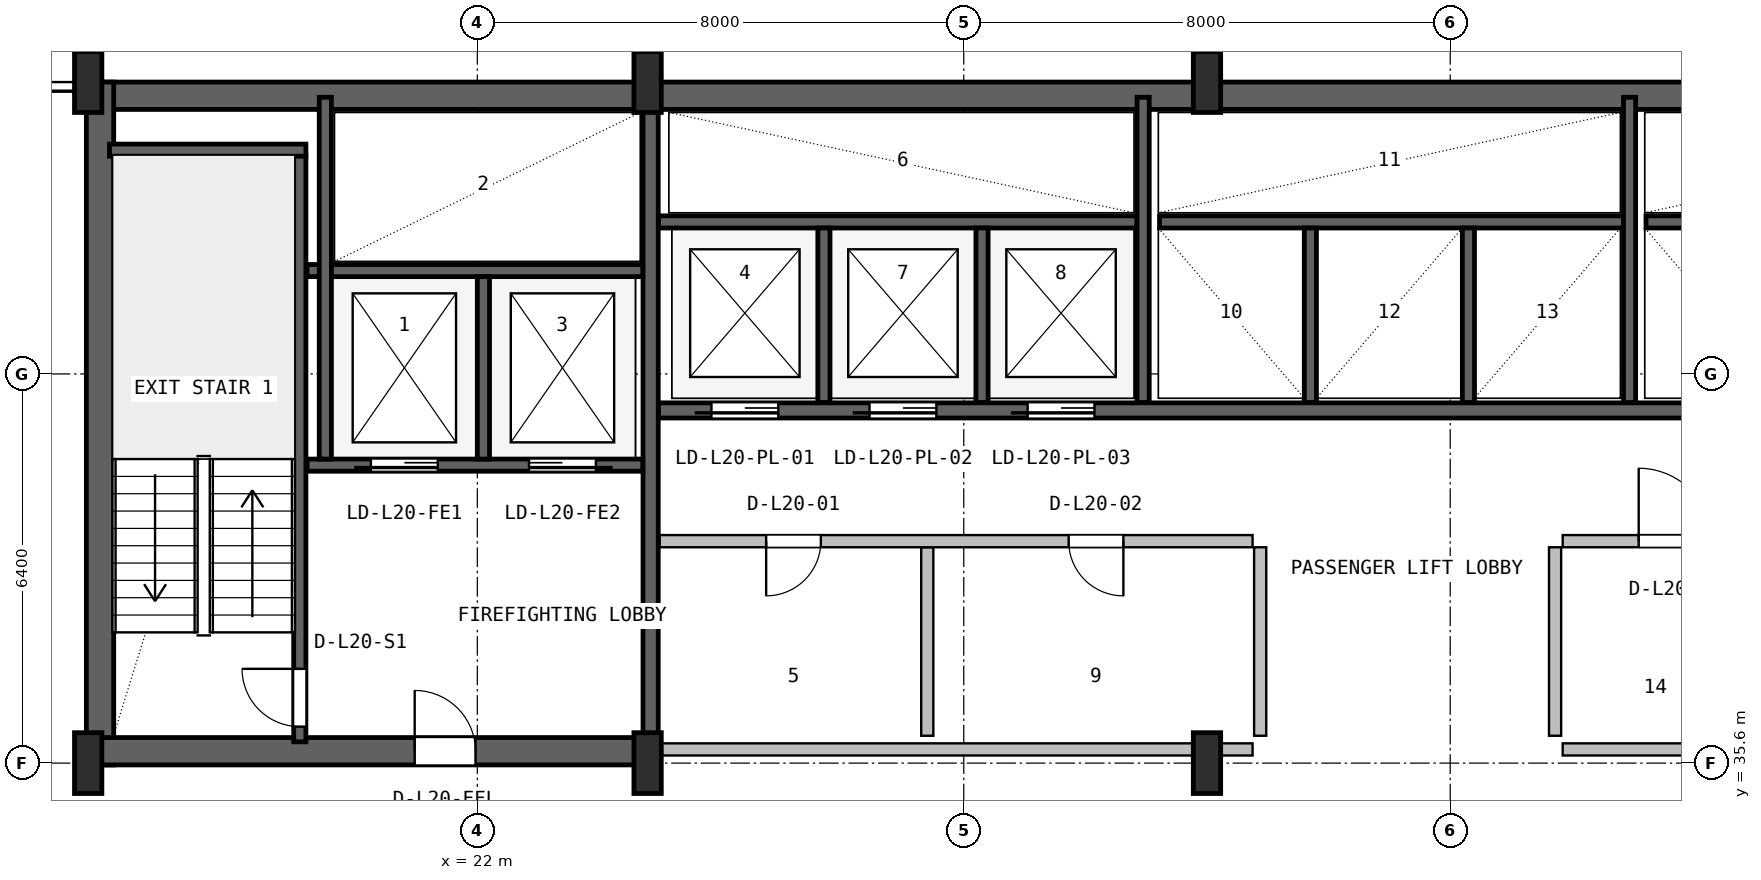
"""IFC4 building model, lengths in metres.
Left out: names, types, materials, properties, quantities, classifications, styles, units other than length and angle.
Written with IfcOpenShell. Run it as: python <this file> out.ifc"""

import sys

from ifc_helpers import new_model, si_unit, direction, frame, frame_2d, origin, origin_2d, place, context, subcontext, project, spatial, rectangle, i_section, extrude, source, transform, mapped, element, fill, save


model = new_model("IFC4")
c1 = context("Model", 3, precision=1e-05, world=origin(), true_north=direction((0.0, 1.0)))
c2 = subcontext(c1, "Body", "Model", "MODEL_VIEW")
j1 = project(units=[si_unit("LENGTHUNIT", "METRE"), si_unit("PLANEANGLEUNIT", "RADIAN")], contexts=[c1])
p1 = place(None, origin())
s1 = spatial("IfcSite", under=j1, at=p1, CompositionType="ELEMENT")
p2 = place(p1, origin())
s2 = spatial("IfcBuilding", under=s1, at=p2, CompositionType="ELEMENT")
p3 = place(p2, frame((0.0, 0.0, 87.0)))
s3 = spatial("IfcBuildingStorey", under=s2, at=p3, CompositionType="ELEMENT", Elevation=87.0)
p4 = place(p3, frame((15.6, 46.575, 0.0), z_axis=(0.0, 0.0, 1.0), x_axis=(1.0, 0.0, 0.0)))
e1 = element("IfcWall", 1, at=p4, inside=s3, PredefinedType="SHEAR", context=c2, shape_type="SweptSolid", body=[
    extrude(rectangle(XDim=36.8, YDim=0.45, at=frame_2d((18.4, 0.0))), origin(), (0.0, 0.0, 1.0), 3.55),
])
p5 = place(p3, frame((15.795, 35.57, 0.0), z_axis=(0.0, 0.0, 1.0), x_axis=(0.0, 1.0, 0.0)))
e2 = element("IfcWall", 2, at=p5, inside=s3, PredefinedType="SHEAR", context=c2, shape_type="SweptSolid", body=[
    extrude(rectangle(XDim=11.23, YDim=0.45, at=frame_2d((5.615, 0.0))), origin(), (0.0, 0.0, 1.0), 3.55),
])
p6 = place(p3, frame((15.57, 35.795, 0.0), z_axis=(0.0, 0.0, 1.0), x_axis=(1.0, 0.0, 0.0)))
e3 = element("IfcWall", 3, at=p6, inside=s3, PredefinedType="SHEAR", context=c2, shape_type="SweptSolid", body=[
    extrude(rectangle(XDim=9.23, YDim=0.45, at=frame_2d((4.615, 0.0))), origin(), (0.0, 0.0, 1.0), 3.55),
])
p7 = place(p6, frame((5.4, 0.0, 0.0)))
e4 = element("IfcOpeningElement", 4, at=p7, cuts=e3, PredefinedType="OPENING", context=c2, shape_type="SweptSolid", body=[
    extrude(rectangle(XDim=1.0, YDim=2.1, at=frame_2d((0.5, 1.05))), frame((0.0, 0.235, 0.0), z_axis=(0.0, -1.0, 0.0), x_axis=(1.0, 0.0, 0.0)), (0.0, 0.0, 1.0), 0.47),
])
m1 = source(origin(), c2, "Body", "SweptSolid", [
    extrude(i_section(OverallWidth=0.45, OverallDepth=1.0, WebThickness=0.016, FlangeThickness=0.03, FilletRadius=0.016, at=origin_2d()), origin(), (0.0, 0.0, 1.0), 3.8),
])
for number, where, z_axis, x_axis in (
    (5, (15.6, 35.6, 0.0), (0.0, 0.0, 1.0), (1.0, 0.0, 0.0)),
    (6, (15.6, 46.8, 0.0), (0.0, 0.0, 1.0), (1.0, 0.0, 0.0)),
    (7, (24.8, 35.6, 0.0), (0.0, 0.0, 1.0), (1.0, 0.0, 0.0)),
    (8, (24.8, 46.8, 0.0), (0.0, 0.0, 1.0), (1.0, 0.0, 0.0)),
    (9, (34.0, 35.6, 0.0), (0.0, 0.0, 1.0), (1.0, 0.0, 0.0)),
    (10, (34.0, 46.8, 0.0), (0.0, 0.0, 1.0), (1.0, 0.0, 0.0)),
):
    element("IfcColumn", number, at=place(p3, frame(where, z_axis=z_axis, x_axis=x_axis)), inside=s3, PredefinedType="COLUMN", context=c2, shape_type="MappedRepresentation", body=[
        mapped(m1, transform((0.0, 0.0, 0.0), x_axis=(1.0, 0.0, 0.0), y_axis=(0.0, 1.0, 0.0), z_axis=(0.0, 0.0, 1.0), scale=1.0)),
    ])
p8 = place(p3, frame((19.08, 35.95, 0.0), z_axis=(0.0, 0.0, 1.0), x_axis=(0.0, 1.0, 0.0)))
e11 = element("IfcWall", 11, at=p8, inside=s3, PredefinedType="SHEAR", context=c2, shape_type="SweptSolid", body=[
    extrude(rectangle(XDim=9.65, YDim=0.2, at=frame_2d((4.825, 0.0))), origin(), (0.0, 0.0, 1.0), 3.55),
])
p9 = place(p8, frame((0.25, 0.0, 0.0)))
e12 = element("IfcOpeningElement", 12, at=p9, cuts=e11, PredefinedType="OPENING", context=c2, shape_type="SweptSolid", body=[
    extrude(rectangle(XDim=0.95, YDim=2.1, at=frame_2d((0.475, 1.05))), frame((0.0, 0.11, 0.0), z_axis=(0.0, -1.0, 0.0), x_axis=(1.0, 0.0, 0.0)), (0.0, 0.0, 1.0), 0.22),
])
p10 = place(p3, frame((15.95, 45.68, 0.0), z_axis=(0.0, 0.0, 1.0), x_axis=(1.0, 0.0, 0.0)))
e13 = element("IfcWall", 13, at=p10, inside=s3, PredefinedType="SHEAR", context=c2, shape_type="SweptSolid", body=[
    extrude(rectangle(XDim=3.23, YDim=0.2, at=frame_2d((1.615, 0.0))), origin(), (0.0, 0.0, 1.0), 3.55),
])
p11 = place(p3, frame((24.85, 36.05, 0.0), z_axis=(0.0, 0.0, 1.0), x_axis=(0.0, 1.0, 0.0)))
e14 = element("IfcWall", 14, at=p11, inside=s3, PredefinedType="SHEAR", context=c2, shape_type="SweptSolid", body=[
    extrude(rectangle(XDim=10.45, YDim=0.25, at=frame_2d((5.225, 0.0))), origin(), (0.0, 0.0, 1.0), 3.55),
])
p12 = place(p3, frame((19.2, 40.5, 0.0), z_axis=(0.0, 0.0, 1.0), x_axis=(1.0, 0.0, 0.0)))
e15 = element("IfcWall", 15, at=p12, inside=s3, PredefinedType="SHEAR", context=c2, shape_type="SweptSolid", body=[
    extrude(rectangle(XDim=5.52, YDim=0.2, at=frame_2d((2.76, 0.0))), origin(), (0.0, 0.0, 1.0), 3.55),
])
p13 = place(p12, frame((1.05, 0.0, 0.0)))
e16 = element("IfcOpeningElement", 16, at=p13, cuts=e15, PredefinedType="OPENING", context=c2, shape_type="SweptSolid", body=[
    extrude(rectangle(XDim=1.1, YDim=2.18, at=frame_2d((0.55, 1.09))), frame((0.0, 0.11, 0.0), z_axis=(0.0, -1.0, 0.0), x_axis=(1.0, 0.0, 0.0)), (0.0, 0.0, 1.0), 0.22),
])
p14 = place(p12, frame((3.65, 0.0, 0.0)))
e17 = element("IfcOpeningElement", 17, at=p14, cuts=e15, PredefinedType="OPENING", context=c2, shape_type="SweptSolid", body=[
    extrude(rectangle(XDim=1.1, YDim=2.18, at=frame_2d((0.55, 1.09))), frame((0.0, 0.11, 0.0), z_axis=(0.0, -1.0, 0.0), x_axis=(1.0, 0.0, 0.0)), (0.0, 0.0, 1.0), 0.22),
])
p15 = place(p3, frame((19.2, 43.7, 0.0), z_axis=(0.0, 0.0, 1.0), x_axis=(1.0, 0.0, 0.0)))
e18 = element("IfcWall", 18, at=p15, inside=s3, PredefinedType="SHEAR", context=c2, shape_type="SweptSolid", body=[
    extrude(rectangle(XDim=5.52, YDim=0.2, at=frame_2d((2.76, 0.0))), origin(), (0.0, 0.0, 1.0), 3.55),
])
p16 = place(p3, frame((22.1, 40.6, 0.0), z_axis=(0.0, 0.0, 1.0), x_axis=(0.0, 1.0, 0.0)))
e19 = element("IfcWall", 19, at=p16, inside=s3, PredefinedType="SHEAR", context=c2, shape_type="SweptSolid", body=[
    extrude(rectangle(XDim=3.0, YDim=0.2, at=frame_2d((1.5, 0.0))), origin(), (0.0, 0.0, 1.0), 3.55),
])
p17 = place(p3, frame((19.5, 40.6, 0.0), z_axis=(0.0, 0.0, 1.0), x_axis=(0.0, 1.0, 0.0)))
e20 = element("IfcWall", 20, at=p17, inside=s3, PredefinedType="SHEAR", context=c2, shape_type="SweptSolid", body=[
    extrude(rectangle(XDim=5.95, YDim=0.2, at=frame_2d((2.975, 0.0))), origin(), (0.0, 0.0, 1.0), 3.55),
])
p18 = place(p3, frame((24.98, 41.4, 0.0), z_axis=(0.0, 0.0, 1.0), x_axis=(1.0, 0.0, 0.0)))
e21 = element("IfcWall", 21, at=p18, inside=s3, PredefinedType="SHEAR", context=c2, shape_type="SweptSolid", body=[
    extrude(rectangle(XDim=23.82, YDim=0.25, at=frame_2d((11.91, 0.0))), origin(), (0.0, 0.0, 1.0), 3.55),
])
p19 = place(p18, frame((0.87, 0.0, 0.0)))
e22 = element("IfcOpeningElement", 22, at=p19, cuts=e21, PredefinedType="OPENING", context=c2, shape_type="SweptSolid", body=[
    extrude(rectangle(XDim=1.1, YDim=2.18, at=frame_2d((0.55, 1.09))), frame((0.0, 0.135, 0.0), z_axis=(0.0, -1.0, 0.0), x_axis=(1.0, 0.0, 0.0)), (0.0, 0.0, 1.0), 0.27),
])
p20 = place(p18, frame((3.47, 0.0, 0.0)))
e23 = element("IfcOpeningElement", 23, at=p20, cuts=e21, PredefinedType="OPENING", context=c2, shape_type="SweptSolid", body=[
    extrude(rectangle(XDim=1.1, YDim=2.18, at=frame_2d((0.55, 1.09))), frame((0.0, 0.135, 0.0), z_axis=(0.0, -1.0, 0.0), x_axis=(1.0, 0.0, 0.0)), (0.0, 0.0, 1.0), 0.27),
])
p21 = place(p18, frame((6.07, 0.0, 0.0)))
e24 = element("IfcOpeningElement", 24, at=p21, cuts=e21, PredefinedType="OPENING", context=c2, shape_type="SweptSolid", body=[
    extrude(rectangle(XDim=1.1, YDim=2.18, at=frame_2d((0.55, 1.09))), frame((0.0, 0.135, 0.0), z_axis=(0.0, -1.0, 0.0), x_axis=(1.0, 0.0, 0.0)), (0.0, 0.0, 1.0), 0.27),
])
p22 = place(p3, frame((24.98, 44.5, 0.0), z_axis=(0.0, 0.0, 1.0), x_axis=(1.0, 0.0, 0.0)))
e25 = element("IfcWall", 25, at=p22, inside=s3, PredefinedType="SHEAR", context=c2, shape_type="SweptSolid", body=[
    extrude(rectangle(XDim=7.87, YDim=0.2, at=frame_2d((3.935, 0.0))), origin(), (0.0, 0.0, 1.0), 3.55),
])
for number, where, z_axis, x_axis in (
    (26, (27.7, 41.53, 0.0), (0.0, 0.0, 1.0), (0.0, 1.0, 0.0)),
    (27, (30.3, 41.53, 0.0), (0.0, 0.0, 1.0), (0.0, 1.0, 0.0)),
):
    element("IfcWall", number, at=place(p3, frame(where, z_axis=z_axis, x_axis=x_axis)), inside=s3, PredefinedType="SHEAR", context=c2, shape_type="SweptSolid", body=[
        extrude(rectangle(XDim=2.87, YDim=0.2, at=frame_2d((1.435, 0.0))), origin(), (0.0, 0.0, 1.0), 3.55),
    ])
p23 = place(p3, frame((32.95, 41.53, 0.0), z_axis=(0.0, 0.0, 1.0), x_axis=(0.0, 1.0, 0.0)))
e28 = element("IfcWall", 28, at=p23, inside=s3, PredefinedType="SHEAR", context=c2, shape_type="SweptSolid", body=[
    extrude(rectangle(XDim=5.02, YDim=0.2, at=frame_2d((2.51, 0.0))), origin(), (0.0, 0.0, 1.0), 3.55),
])
p24 = place(p3, frame((33.22, 44.5, 0.0), z_axis=(0.0, 0.0, 1.0), x_axis=(1.0, 0.0, 0.0)))
e29 = element("IfcWall", 29, at=p24, inside=s3, PredefinedType="SHEAR", context=c2, shape_type="SweptSolid", body=[
    extrude(rectangle(XDim=7.63, YDim=0.2, at=frame_2d((3.815, 0.0))), origin(), (0.0, 0.0, 1.0), 3.55),
])
for number, where, z_axis, x_axis in (
    (30, (35.7, 41.53, 0.0), (0.0, 0.0, 1.0), (0.0, 1.0, 0.0)),
    (31, (38.3, 41.53, 0.0), (0.0, 0.0, 1.0), (0.0, 1.0, 0.0)),
):
    element("IfcWall", number, at=place(p3, frame(where, z_axis=z_axis, x_axis=x_axis)), inside=s3, PredefinedType="SHEAR", context=c2, shape_type="SweptSolid", body=[
        extrude(rectangle(XDim=2.87, YDim=0.2, at=frame_2d((1.435, 0.0))), origin(), (0.0, 0.0, 1.0), 3.55),
    ])
p25 = place(p3, frame((40.95, 41.53, 0.0), z_axis=(0.0, 0.0, 1.0), x_axis=(0.0, 1.0, 0.0)))
e32 = element("IfcWall", 32, at=p25, inside=s3, PredefinedType="SHEAR", context=c2, shape_type="SweptSolid", body=[
    extrude(rectangle(XDim=5.02, YDim=0.2, at=frame_2d((2.51, 0.0))), origin(), (0.0, 0.0, 1.0), 3.55),
])
p26 = place(p3, frame((41.22, 44.5, 0.0), z_axis=(0.0, 0.0, 1.0), x_axis=(1.0, 0.0, 0.0)))
e33 = element("IfcWall", 33, at=p26, inside=s3, PredefinedType="SHEAR", context=c2, shape_type="SweptSolid", body=[
    extrude(rectangle(XDim=7.58, YDim=0.2, at=frame_2d((3.79, 0.0))), origin(), (0.0, 0.0, 1.0), 3.55),
])
p27 = place(p3, frame((25.0, 35.825, 0.0), z_axis=(0.0, 0.0, 1.0), x_axis=(1.0, 0.0, 0.0)))
e34 = element("IfcWall", 34, at=p27, inside=s3, PredefinedType="PLUMBINGWALL", context=c2, shape_type="SweptSolid", body=[
    extrude(rectangle(XDim=9.75, YDim=0.2, at=frame_2d((4.875, 0.0))), origin(), (0.0, 0.0, 1.0), 2.325),
])
p28 = place(p3, frame((29.4, 36.05, 0.0), z_axis=(0.0, 0.0, 1.0), x_axis=(0.0, 1.0, 0.0)))
e35 = element("IfcWall", 35, at=p28, inside=s3, PredefinedType="PLUMBINGWALL", context=c2, shape_type="SweptSolid", body=[
    extrude(rectangle(XDim=3.1, YDim=0.2, at=frame_2d((1.55, 0.0))), origin(), (0.0, 0.0, 1.0), 3.53),
])
p29 = place(p3, frame((25.0, 39.25, 0.0), z_axis=(0.0, 0.0, 1.0), x_axis=(1.0, 0.0, 0.0)))
e36 = element("IfcWall", 36, at=p29, inside=s3, PredefinedType="PLUMBINGWALL", context=c2, shape_type="SweptSolid", body=[
    extrude(rectangle(XDim=9.75, YDim=0.2, at=frame_2d((4.875, 0.0))), origin(), (0.0, 0.0, 1.0), 3.53),
])
p30 = place(p29, frame((1.75, 0.0, 0.0)))
e37 = element("IfcOpeningElement", 37, at=p30, cuts=e36, PredefinedType="OPENING", context=c2, shape_type="SweptSolid", body=[
    extrude(rectangle(XDim=0.9, YDim=2.06, at=frame_2d((0.45, 1.03))), frame((0.0, 0.11, 0.0), z_axis=(0.0, -1.0, 0.0), x_axis=(1.0, 0.0, 0.0)), (0.0, 0.0, 1.0), 0.22),
])
p31 = place(p29, frame((6.725, 0.0, 0.0)))
e38 = element("IfcOpeningElement", 38, at=p31, cuts=e36, PredefinedType="OPENING", context=c2, shape_type="SweptSolid", body=[
    extrude(rectangle(XDim=0.9, YDim=2.06, at=frame_2d((0.45, 1.03))), frame((0.0, 0.11, 0.0), z_axis=(0.0, -1.0, 0.0), x_axis=(1.0, 0.0, 0.0)), (0.0, 0.0, 1.0), 0.22),
])
p32 = place(p3, frame((34.875, 36.05, 0.0), z_axis=(0.0, 0.0, 1.0), x_axis=(0.0, 1.0, 0.0)))
e39 = element("IfcWall", 39, at=p32, inside=s3, PredefinedType="PLUMBINGWALL", context=c2, shape_type="SweptSolid", body=[
    extrude(rectangle(XDim=3.1, YDim=0.2, at=frame_2d((1.55, 0.0))), origin(), (0.0, 0.0, 1.0), 3.53),
])
p33 = place(p3, frame((39.85, 35.825, 0.0), z_axis=(0.0, 0.0, 1.0), x_axis=(1.0, 0.0, 0.0)))
e40 = element("IfcWall", 40, at=p33, inside=s3, PredefinedType="SOLIDWALL", context=c2, shape_type="SweptSolid", body=[
    extrude(rectangle(XDim=3.7, YDim=0.2, at=frame_2d((1.85, 0.0))), origin(), (0.0, 0.0, 1.0), 2.325),
])
p34 = place(p3, frame((39.85, 39.25, 0.0), z_axis=(0.0, 0.0, 1.0), x_axis=(1.0, 0.0, 0.0)))
e41 = element("IfcWall", 41, at=p34, inside=s3, PredefinedType="SOLIDWALL", context=c2, shape_type="SweptSolid", body=[
    extrude(rectangle(XDim=3.7, YDim=0.2, at=frame_2d((1.85, 0.0))), origin(), (0.0, 0.0, 1.0), 3.53),
])
p35 = place(p34, frame((1.25, 0.0, 0.0)))
e42 = element("IfcOpeningElement", 42, at=p35, cuts=e41, PredefinedType="OPENING", context=c2, shape_type="SweptSolid", body=[
    extrude(rectangle(XDim=1.2, YDim=2.1, at=frame_2d((0.6, 1.05))), frame((0.0, 0.11, 0.0), z_axis=(0.0, -1.0, 0.0), x_axis=(1.0, 0.0, 0.0)), (0.0, 0.0, 1.0), 0.22),
])
p36 = place(p3, frame((39.725, 36.05, 0.0), z_axis=(0.0, 0.0, 1.0), x_axis=(0.0, 1.0, 0.0)))
e43 = element("IfcWall", 43, at=p36, inside=s3, PredefinedType="SOLIDWALL", context=c2, shape_type="SweptSolid", body=[
    extrude(rectangle(XDim=3.1, YDim=0.2, at=frame_2d((1.55, 0.0))), origin(), (0.0, 0.0, 1.0), 3.53),
])
m2 = source(origin(), c2, "Body", "SweptSolid", [
    extrude(rectangle(XDim=0.95, YDim=2.1, at=frame_2d((0.475, 1.05))), frame((0.0, 0.025, 0.0), z_axis=(0.0, -1.0, 0.0), x_axis=(1.0, 0.0, 0.0)), (0.0, 0.0, 1.0), 0.05),
])
p37 = place(p9, origin())
e44 = element("IfcDoor", 44, at=p37, inside=s3, OperationType="SINGLE_SWING_RIGHT", PredefinedType="DOOR", context=c2, shape_type="MappedRepresentation", body=[
    mapped(m2, transform((0.0, 0.0, 0.0), x_axis=(1.0, 0.0, 0.0), y_axis=(0.0, 1.0, 0.0), z_axis=(0.0, 0.0, 1.0), scale=1.0)),
])
fill(e12, e44)
m3 = source(origin(), c2, "Body", "SweptSolid", [
    extrude(rectangle(XDim=1.0, YDim=2.1, at=frame_2d((0.5, 1.05))), frame((0.0, 0.025, 0.0), z_axis=(0.0, -1.0, 0.0), x_axis=(1.0, 0.0, 0.0)), (0.0, 0.0, 1.0), 0.05),
])
p38 = place(p7, origin())
e45 = element("IfcDoor", 45, at=p38, inside=s3, OperationType="SINGLE_SWING_LEFT", PredefinedType="DOOR", context=c2, shape_type="MappedRepresentation", body=[
    mapped(m3, transform((0.0, 0.0, 0.0), x_axis=(1.0, 0.0, 0.0), y_axis=(0.0, 1.0, 0.0), z_axis=(0.0, 0.0, 1.0), scale=1.0)),
])
fill(e4, e45)
m4 = source(origin(), c2, "Body", "SweptSolid", [
    extrude(rectangle(XDim=1.1, YDim=2.18, at=frame_2d((0.55, 1.09))), frame((0.0, 0.025, 0.0), z_axis=(0.0, -1.0, 0.0), x_axis=(1.0, 0.0, 0.0)), (0.0, 0.0, 1.0), 0.05),
])
p39 = place(p13, frame((1.1, 0.0, 0.0), z_axis=(0.0, 0.0, 1.0), x_axis=(-1.0, 0.0, 0.0)))
e46 = element("IfcDoor", 46, at=p39, inside=s3, OperationType="SLIDING_TO_LEFT", PredefinedType="DOOR", context=c2, shape_type="MappedRepresentation", body=[
    mapped(m4, transform((0.0, 0.0, 0.0), x_axis=(1.0, 0.0, 0.0), y_axis=(0.0, 1.0, 0.0), z_axis=(0.0, 0.0, 1.0), scale=1.0)),
])
fill(e16, e46)
p40 = place(p14, frame((1.1, 0.0, 0.0), z_axis=(0.0, 0.0, 1.0), x_axis=(-1.0, 0.0, 0.0)))
e47 = element("IfcDoor", 47, at=p40, inside=s3, OperationType="SLIDING_TO_RIGHT", PredefinedType="DOOR", context=c2, shape_type="MappedRepresentation", body=[
    mapped(m4, transform((0.0, 0.0, 0.0), x_axis=(1.0, 0.0, 0.0), y_axis=(0.0, 1.0, 0.0), z_axis=(0.0, 0.0, 1.0), scale=1.0)),
])
fill(e17, e47)
p41 = place(p19, frame((1.1, 0.0, 0.0), z_axis=(0.0, 0.0, 1.0), x_axis=(-1.0, 0.0, 0.0)))
e48 = element("IfcDoor", 48, at=p41, inside=s3, OperationType="SLIDING_TO_LEFT", PredefinedType="DOOR", context=c2, shape_type="MappedRepresentation", body=[
    mapped(m4, transform((0.0, 0.0, 0.0), x_axis=(1.0, 0.0, 0.0), y_axis=(0.0, 1.0, 0.0), z_axis=(0.0, 0.0, 1.0), scale=1.0)),
])
fill(e22, e48)
p42 = place(p20, frame((1.1, 0.0, 0.0), z_axis=(0.0, 0.0, 1.0), x_axis=(-1.0, 0.0, 0.0)))
e49 = element("IfcDoor", 49, at=p42, inside=s3, OperationType="SLIDING_TO_LEFT", PredefinedType="DOOR", context=c2, shape_type="MappedRepresentation", body=[
    mapped(m4, transform((0.0, 0.0, 0.0), x_axis=(1.0, 0.0, 0.0), y_axis=(0.0, 1.0, 0.0), z_axis=(0.0, 0.0, 1.0), scale=1.0)),
])
fill(e23, e49)
p43 = place(p21, frame((1.1, 0.0, 0.0), z_axis=(0.0, 0.0, 1.0), x_axis=(-1.0, 0.0, 0.0)))
e50 = element("IfcDoor", 50, at=p43, inside=s3, OperationType="SLIDING_TO_LEFT", PredefinedType="DOOR", context=c2, shape_type="MappedRepresentation", body=[
    mapped(m4, transform((0.0, 0.0, 0.0), x_axis=(1.0, 0.0, 0.0), y_axis=(0.0, 1.0, 0.0), z_axis=(0.0, 0.0, 1.0), scale=1.0)),
])
fill(e24, e50)
m5 = source(origin(), c2, "Body", "SweptSolid", [
    extrude(rectangle(XDim=0.9, YDim=2.06, at=frame_2d((0.45, 1.03))), frame((0.0, 0.025, 0.0), z_axis=(0.0, -1.0, 0.0), x_axis=(1.0, 0.0, 0.0)), (0.0, 0.0, 1.0), 0.05),
])
p44 = place(p30, frame((0.9, 0.0, 0.0), z_axis=(0.0, 0.0, 1.0), x_axis=(-1.0, 0.0, 0.0)))
e51 = element("IfcDoor", 51, at=p44, inside=s3, OperationType="SINGLE_SWING_LEFT", PredefinedType="DOOR", context=c2, shape_type="MappedRepresentation", body=[
    mapped(m5, transform((0.0, 0.0, 0.0), x_axis=(1.0, 0.0, 0.0), y_axis=(0.0, 1.0, 0.0), z_axis=(0.0, 0.0, 1.0), scale=1.0)),
])
fill(e37, e51)
p45 = place(p31, frame((0.9, 0.0, 0.0), z_axis=(0.0, 0.0, 1.0), x_axis=(-1.0, 0.0, 0.0)))
e52 = element("IfcDoor", 52, at=p45, inside=s3, OperationType="SINGLE_SWING_RIGHT", PredefinedType="DOOR", context=c2, shape_type="MappedRepresentation", body=[
    mapped(m5, transform((0.0, 0.0, 0.0), x_axis=(1.0, 0.0, 0.0), y_axis=(0.0, 1.0, 0.0), z_axis=(0.0, 0.0, 1.0), scale=1.0)),
])
fill(e38, e52)
m6 = source(origin(), c2, "Body", "SweptSolid", [
    extrude(rectangle(XDim=1.2, YDim=2.1, at=frame_2d((0.6, 1.05))), frame((0.0, 0.025, 0.0), z_axis=(0.0, -1.0, 0.0), x_axis=(1.0, 0.0, 0.0)), (0.0, 0.0, 1.0), 0.05),
])
p46 = place(p35, origin())
e53 = element("IfcDoor", 53, at=p46, inside=s3, OperationType="SINGLE_SWING_LEFT", PredefinedType="DOOR", context=c2, shape_type="MappedRepresentation", body=[
    mapped(m6, transform((0.0, 0.0, 0.0), x_axis=(1.0, 0.0, 0.0), y_axis=(0.0, 1.0, 0.0), z_axis=(0.0, 0.0, 1.0), scale=1.0)),
])
fill(e42, e53)
save(model, sys.argv[1])
